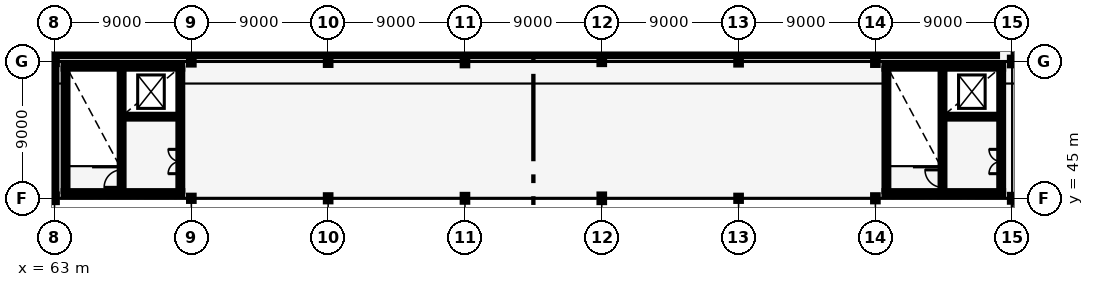
"""IFC4 building model, lengths in metres.
Left out: names, types, materials, properties, quantities, classifications, styles, units other than length and angle.
Written with IfcOpenShell. Run it as: python <this file> out.ifc"""

import sys

from ifc_helpers import new_model, si_unit, direction, frame, frame_2d, origin, origin_2d, place, context, subcontext, project, spatial, rectangle, i_section, extrude, element, fill, save


model = new_model("IFC4")
c1 = context("Model", 3, precision=1e-05, world=origin(), true_north=direction((0.0, 1.0)))
c2 = subcontext(c1, "Body", "Model", "MODEL_VIEW")
j1 = project(units=[si_unit("LENGTHUNIT", "METRE"), si_unit("PLANEANGLEUNIT", "RADIAN")], contexts=[c1])
p1 = place(None, origin())
s1 = spatial("IfcSite", under=j1, at=p1, CompositionType="ELEMENT")
p2 = place(p1, origin())
s2 = spatial("IfcBuilding", under=s1, at=p2, CompositionType="ELEMENT")
p3 = place(p2, frame((0.0, 0.0, 18.0)))
s3 = spatial("IfcBuildingStorey", under=s2, at=p3, CompositionType="ELEMENT", Elevation=18.0)
p4 = place(p3, frame((63.0, 45.0, 0.0), z_axis=(0.0, 0.0, 1.0), x_axis=(1.0, 0.0, 0.0)))
e1 = element("IfcColumn", 1, at=p4, inside=s3, PredefinedType="COLUMN", context=c2, shape_type="SweptSolid", body=[
    extrude(i_section(OverallWidth=0.3, OverallDepth=0.5, WebThickness=0.014, FlangeThickness=0.028, FilletRadius=0.027, at=origin_2d()), origin(), (0.0, 0.0, 1.0), 4.8),
])
for number, where, z_axis, x_axis in (
    (2, (63.0, 54.0, 0.0), (0.0, 0.0, 1.0), (1.0, 0.0, 0.0)),
    (3, (72.0, 45.0, 0.0), (0.0, 0.0, 1.0), (1.0, 0.0, 0.0)),
):
    element("IfcColumn", number, at=place(p3, frame(where, z_axis=z_axis, x_axis=x_axis)), inside=s3, PredefinedType="COLUMN", context=c2, shape_type="SweptSolid", body=[
        extrude(i_section(OverallWidth=0.3, OverallDepth=0.34, WebThickness=0.012, FlangeThickness=0.021, FilletRadius=0.027, at=origin_2d()), origin(), (0.0, 0.0, 1.0), 4.8),
    ])
for number, where, z_axis, x_axis in (
    (4, (72.0, 54.0, 0.0), (0.0, 0.0, 1.0), (1.0, 0.0, 0.0)),
    (5, (81.0, 45.0, 0.0), (0.0, 0.0, 1.0), (1.0, 0.0, 0.0)),
):
    element("IfcColumn", number, at=place(p3, frame(where, z_axis=z_axis, x_axis=x_axis)), inside=s3, PredefinedType="COLUMN", context=c2, shape_type="SweptSolid", body=[
        extrude(i_section(OverallWidth=0.3, OverallDepth=0.4, WebThickness=0.013, FlangeThickness=0.024, FilletRadius=0.027, at=origin_2d()), origin(), (0.0, 0.0, 1.0), 4.8),
    ])
for number, where, z_axis, x_axis in (
    (6, (81.0, 54.0, 0.0), (0.0, 0.0, 1.0), (1.0, 0.0, 0.0)),
    (7, (90.0, 45.0, 0.0), (0.0, 0.0, 1.0), (1.0, 0.0, 0.0)),
):
    element("IfcColumn", number, at=place(p3, frame(where, z_axis=z_axis, x_axis=x_axis)), inside=s3, PredefinedType="COLUMN", context=c2, shape_type="SweptSolid", body=[
        extrude(i_section(OverallWidth=0.3, OverallDepth=0.45, WebThickness=0.014, FlangeThickness=0.026, FilletRadius=0.027, at=origin_2d()), origin(), (0.0, 0.0, 1.0), 4.8),
    ])
for number, where, z_axis, x_axis in (
    (8, (90.0, 54.0, 0.0), (0.0, 0.0, 1.0), (1.0, 0.0, 0.0)),
    (9, (99.0, 45.0, 0.0), (0.0, 0.0, 1.0), (1.0, 0.0, 0.0)),
):
    element("IfcColumn", number, at=place(p3, frame(where, z_axis=z_axis, x_axis=x_axis)), inside=s3, PredefinedType="COLUMN", context=c2, shape_type="SweptSolid", body=[
        extrude(i_section(OverallWidth=0.3, OverallDepth=0.5, WebThickness=0.014, FlangeThickness=0.028, FilletRadius=0.027, at=origin_2d()), origin(), (0.0, 0.0, 1.0), 4.8),
    ])
for number, where, z_axis, x_axis in (
    (10, (99.0, 54.0, 0.0), (0.0, 0.0, 1.0), (1.0, 0.0, 0.0)),
    (11, (108.0, 45.0, 0.0), (0.0, 0.0, 1.0), (1.0, 0.0, 0.0)),
):
    element("IfcColumn", number, at=place(p3, frame(where, z_axis=z_axis, x_axis=x_axis)), inside=s3, PredefinedType="COLUMN", context=c2, shape_type="SweptSolid", body=[
        extrude(i_section(OverallWidth=0.3, OverallDepth=0.34, WebThickness=0.012, FlangeThickness=0.021, FilletRadius=0.027, at=origin_2d()), origin(), (0.0, 0.0, 1.0), 4.8),
    ])
for number, where, z_axis, x_axis in (
    (12, (108.0, 54.0, 0.0), (0.0, 0.0, 1.0), (1.0, 0.0, 0.0)),
    (13, (117.0, 45.0, 0.0), (0.0, 0.0, 1.0), (1.0, 0.0, 0.0)),
):
    element("IfcColumn", number, at=place(p3, frame(where, z_axis=z_axis, x_axis=x_axis)), inside=s3, PredefinedType="COLUMN", context=c2, shape_type="SweptSolid", body=[
        extrude(i_section(OverallWidth=0.3, OverallDepth=0.4, WebThickness=0.013, FlangeThickness=0.024, FilletRadius=0.027, at=origin_2d()), origin(), (0.0, 0.0, 1.0), 4.8),
    ])
for number, where, z_axis, x_axis in (
    (14, (117.0, 54.0, 0.0), (0.0, 0.0, 1.0), (1.0, 0.0, 0.0)),
    (15, (126.0, 45.0, 0.0), (0.0, 0.0, 1.0), (1.0, 0.0, 0.0)),
):
    element("IfcColumn", number, at=place(p3, frame(where, z_axis=z_axis, x_axis=x_axis)), inside=s3, PredefinedType="COLUMN", context=c2, shape_type="SweptSolid", body=[
        extrude(i_section(OverallWidth=0.3, OverallDepth=0.45, WebThickness=0.014, FlangeThickness=0.026, FilletRadius=0.027, at=origin_2d()), origin(), (0.0, 0.0, 1.0), 4.8),
    ])
p5 = place(p3, frame((126.0, 54.0, 0.0), z_axis=(0.0, 0.0, 1.0), x_axis=(1.0, 0.0, 0.0)))
e16 = element("IfcColumn", 16, at=p5, inside=s3, PredefinedType="COLUMN", context=c2, shape_type="SweptSolid", body=[
    extrude(i_section(OverallWidth=0.3, OverallDepth=0.5, WebThickness=0.014, FlangeThickness=0.028, FilletRadius=0.027, at=origin_2d()), origin(), (0.0, 0.0, 1.0), 4.8),
])
p6 = place(p3, frame((63.0, 45.245, 0.0), z_axis=(0.0, 0.0, 1.0), x_axis=(0.0, 1.0, 0.0)))
e17 = element("IfcWall", 17, at=p6, inside=s3, PredefinedType="SOLIDWALL", context=c2, shape_type="SweptSolid", body=[
    extrude(rectangle(XDim=8.59, YDim=0.24, at=frame_2d((4.295, 0.0))), origin(), (0.0, 0.0, 1.0), 3.65),
])
p7 = place(p3, frame((1.0, 54.45, 0.09), z_axis=(0.0, 0.0, 1.0), x_axis=(1.0, 0.0, 0.0)))
e18 = element("IfcWall", 18, at=p7, inside=s3, PredefinedType="PARAPET", context=c2, shape_type="SweptSolid", body=[
    extrude(rectangle(XDim=124.0, YDim=0.195, at=frame_2d((62.0, 0.0))), origin(), (0.0, 0.0, 1.0), 0.49),
])
p8 = place(p3, frame((63.725, 45.47, 0.0), z_axis=(0.0, 0.0, 1.0), x_axis=(0.0, 1.0, 0.0)))
e19 = element("IfcWall", 19, at=p8, inside=s3, PredefinedType="SHEAR", context=c2, shape_type="SweptSolid", body=[
    extrude(rectangle(XDim=8.06, YDim=0.25, at=frame_2d((4.03, 0.0))), origin(), (0.0, 0.0, 1.0), 4.46),
])
p9 = place(p3, frame((71.275, 45.47, 0.0), z_axis=(0.0, 0.0, 1.0), x_axis=(0.0, 1.0, 0.0)))
e20 = element("IfcWall", 20, at=p9, inside=s3, PredefinedType="SHEAR", context=c2, shape_type="SweptSolid", body=[
    extrude(rectangle(XDim=8.06, YDim=0.25, at=frame_2d((4.03, 0.0))), origin(), (0.0, 0.0, 1.0), 4.46),
])
p10 = place(p9, frame((1.15, 0.0, 0.0)))
e21 = element("IfcOpeningElement", 21, at=p10, cuts=e20, PredefinedType="OPENING", context=c2, shape_type="SweptSolid", body=[
    extrude(rectangle(XDim=1.6, YDim=2.2, at=frame_2d((0.8, 1.1))), frame((0.0, 0.135, 0.0), z_axis=(0.0, -1.0, 0.0), x_axis=(1.0, 0.0, 0.0)), (0.0, 0.0, 1.0), 0.27),
])
for number, where, z_axis, x_axis in (
    (22, (63.6, 45.345, 0.0), (0.0, 0.0, 1.0), (1.0, 0.0, 0.0)),
    (23, (63.6, 53.655, 0.0), (0.0, 0.0, 1.0), (1.0, 0.0, 0.0)),
):
    element("IfcWall", number, at=place(p3, frame(where, z_axis=z_axis, x_axis=x_axis)), inside=s3, PredefinedType="SHEAR", context=c2, shape_type="SweptSolid", body=[
        extrude(rectangle(XDim=7.8, YDim=0.25, at=frame_2d((3.9, 0.0))), origin(), (0.0, 0.0, 1.0), 4.46),
    ])
p11 = place(p3, frame((67.415, 45.47, 0.0), z_axis=(0.0, 0.0, 1.0), x_axis=(0.0, 1.0, 0.0)))
e24 = element("IfcWall", 24, at=p11, inside=s3, PredefinedType="SHEAR", context=c2, shape_type="SweptSolid", body=[
    extrude(rectangle(XDim=8.06, YDim=0.25, at=frame_2d((4.03, 0.0))), origin(), (0.0, 0.0, 1.0), 4.46),
])
p12 = place(p11, frame((0.25, 0.0, 0.0)))
e25 = element("IfcOpeningElement", 25, at=p12, cuts=e24, PredefinedType="OPENING", context=c2, shape_type="SweptSolid", body=[
    extrude(rectangle(XDim=1.15, YDim=2.15, at=frame_2d((0.575, 1.075))), frame((0.0, 0.135, 0.0), z_axis=(0.0, -1.0, 0.0), x_axis=(1.0, 0.0, 0.0)), (0.0, 0.0, 1.0), 0.27),
])
p13 = place(p3, frame((67.54, 50.37, 0.0), z_axis=(0.0, 0.0, 1.0), x_axis=(1.0, 0.0, 0.0)))
e26 = element("IfcWall", 26, at=p13, inside=s3, PredefinedType="SHEAR", context=c2, shape_type="SweptSolid", body=[
    extrude(rectangle(XDim=3.61, YDim=0.25, at=frame_2d((1.805, 0.0))), origin(), (0.0, 0.0, 1.0), 4.46),
])
p14 = place(p13, frame((0.95, 0.0, 0.0)))
e27 = element("IfcOpeningElement", 27, at=p14, cuts=e26, PredefinedType="OPENING", context=c2, shape_type="SweptSolid", body=[
    extrude(rectangle(XDim=1.2, YDim=2.2, at=frame_2d((0.6, 1.1))), frame((0.0, 0.135, 0.0), z_axis=(0.0, -1.0, 0.0), x_axis=(1.0, 0.0, 0.0)), (0.0, 0.0, 1.0), 0.27),
])
p15 = place(p3, frame((117.725, 45.47, 0.0), z_axis=(0.0, 0.0, 1.0), x_axis=(0.0, 1.0, 0.0)))
e28 = element("IfcWall", 28, at=p15, inside=s3, PredefinedType="SHEAR", context=c2, shape_type="SweptSolid", body=[
    extrude(rectangle(XDim=8.06, YDim=0.25, at=frame_2d((4.03, 0.0))), origin(), (0.0, 0.0, 1.0), 4.46),
])
p16 = place(p3, frame((125.275, 45.47, 0.0), z_axis=(0.0, 0.0, 1.0), x_axis=(0.0, 1.0, 0.0)))
e29 = element("IfcWall", 29, at=p16, inside=s3, PredefinedType="SHEAR", context=c2, shape_type="SweptSolid", body=[
    extrude(rectangle(XDim=8.06, YDim=0.25, at=frame_2d((4.03, 0.0))), origin(), (0.0, 0.0, 1.0), 4.46),
])
p17 = place(p16, frame((1.15, 0.0, 0.0)))
e30 = element("IfcOpeningElement", 30, at=p17, cuts=e29, PredefinedType="OPENING", context=c2, shape_type="SweptSolid", body=[
    extrude(rectangle(XDim=1.6, YDim=2.2, at=frame_2d((0.8, 1.1))), frame((0.0, 0.135, 0.0), z_axis=(0.0, -1.0, 0.0), x_axis=(1.0, 0.0, 0.0)), (0.0, 0.0, 1.0), 0.27),
])
for number, where, z_axis, x_axis in (
    (31, (117.6, 45.345, 0.0), (0.0, 0.0, 1.0), (1.0, 0.0, 0.0)),
    (32, (117.6, 53.655, 0.0), (0.0, 0.0, 1.0), (1.0, 0.0, 0.0)),
):
    element("IfcWall", number, at=place(p3, frame(where, z_axis=z_axis, x_axis=x_axis)), inside=s3, PredefinedType="SHEAR", context=c2, shape_type="SweptSolid", body=[
        extrude(rectangle(XDim=7.8, YDim=0.25, at=frame_2d((3.9, 0.0))), origin(), (0.0, 0.0, 1.0), 4.46),
    ])
p18 = place(p3, frame((121.415, 45.47, 0.0), z_axis=(0.0, 0.0, 1.0), x_axis=(0.0, 1.0, 0.0)))
e33 = element("IfcWall", 33, at=p18, inside=s3, PredefinedType="SHEAR", context=c2, shape_type="SweptSolid", body=[
    extrude(rectangle(XDim=8.06, YDim=0.25, at=frame_2d((4.03, 0.0))), origin(), (0.0, 0.0, 1.0), 4.46),
])
p19 = place(p18, frame((0.25, 0.0, 0.0)))
e34 = element("IfcOpeningElement", 34, at=p19, cuts=e33, PredefinedType="OPENING", context=c2, shape_type="SweptSolid", body=[
    extrude(rectangle(XDim=1.15, YDim=2.15, at=frame_2d((0.575, 1.075))), frame((0.0, 0.135, 0.0), z_axis=(0.0, -1.0, 0.0), x_axis=(1.0, 0.0, 0.0)), (0.0, 0.0, 1.0), 0.27),
])
p20 = place(p3, frame((121.54, 50.37, 0.0), z_axis=(0.0, 0.0, 1.0), x_axis=(1.0, 0.0, 0.0)))
e35 = element("IfcWall", 35, at=p20, inside=s3, PredefinedType="SHEAR", context=c2, shape_type="SweptSolid", body=[
    extrude(rectangle(XDim=3.61, YDim=0.25, at=frame_2d((1.805, 0.0))), origin(), (0.0, 0.0, 1.0), 4.46),
])
p21 = place(p20, frame((0.95, 0.0, 0.0)))
e36 = element("IfcOpeningElement", 36, at=p21, cuts=e35, PredefinedType="OPENING", context=c2, shape_type="SweptSolid", body=[
    extrude(rectangle(XDim=1.2, YDim=2.2, at=frame_2d((0.6, 1.1))), frame((0.0, 0.135, 0.0), z_axis=(0.0, -1.0, 0.0), x_axis=(1.0, 0.0, 0.0)), (0.0, 0.0, 1.0), 0.27),
])
p22 = place(p12, origin())
e37 = element("IfcDoor", 37, at=p22, inside=s3, OperationType="SINGLE_SWING_LEFT", PredefinedType="DOOR", context=c2, shape_type="SweptSolid", body=[
    extrude(rectangle(XDim=1.15, YDim=2.15, at=frame_2d((0.575, 1.075))), frame((0.0, 0.025, 0.0), z_axis=(0.0, -1.0, 0.0), x_axis=(1.0, 0.0, 0.0)), (0.0, 0.0, 1.0), 0.05),
])
fill(e25, e37)
p23 = place(p14, origin())
e38 = element("IfcDoor", 38, at=p23, inside=s3, OperationType="DOUBLE_DOOR_SLIDING", PredefinedType="DOOR", context=c2, shape_type="SweptSolid", body=[
    extrude(rectangle(XDim=1.2, YDim=2.2, at=frame_2d((0.6, 1.1))), frame((0.0, 0.025, 0.0), z_axis=(0.0, -1.0, 0.0), x_axis=(1.0, 0.0, 0.0)), (0.0, 0.0, 1.0), 0.05),
])
fill(e27, e38)
p24 = place(p10, origin())
e39 = element("IfcDoor", 39, at=p24, inside=s3, OperationType="DOUBLE_DOOR_SINGLE_SWING", PredefinedType="DOOR", context=c2, shape_type="SweptSolid", body=[
    extrude(rectangle(XDim=1.6, YDim=2.2, at=frame_2d((0.8, 1.1))), frame((0.0, 0.025, 0.0), z_axis=(0.0, -1.0, 0.0), x_axis=(1.0, 0.0, 0.0)), (0.0, 0.0, 1.0), 0.05),
])
fill(e21, e39)
p25 = place(p19, origin())
e40 = element("IfcDoor", 40, at=p25, inside=s3, OperationType="SINGLE_SWING_RIGHT", PredefinedType="DOOR", context=c2, shape_type="SweptSolid", body=[
    extrude(rectangle(XDim=1.15, YDim=2.15, at=frame_2d((0.575, 1.075))), frame((0.0, 0.025, 0.0), z_axis=(0.0, -1.0, 0.0), x_axis=(1.0, 0.0, 0.0)), (0.0, 0.0, 1.0), 0.05),
])
fill(e34, e40)
p26 = place(p21, origin())
e41 = element("IfcDoor", 41, at=p26, inside=s3, OperationType="DOUBLE_DOOR_SLIDING", PredefinedType="DOOR", context=c2, shape_type="SweptSolid", body=[
    extrude(rectangle(XDim=1.2, YDim=2.2, at=frame_2d((0.6, 1.1))), frame((0.0, 0.025, 0.0), z_axis=(0.0, -1.0, 0.0), x_axis=(1.0, 0.0, 0.0)), (0.0, 0.0, 1.0), 0.05),
])
fill(e36, e41)
p27 = place(p17, origin())
e42 = element("IfcDoor", 42, at=p27, inside=s3, OperationType="DOUBLE_DOOR_SINGLE_SWING", PredefinedType="DOOR", context=c2, shape_type="SweptSolid", body=[
    extrude(rectangle(XDim=1.6, YDim=2.2, at=frame_2d((0.8, 1.1))), frame((0.0, 0.025, 0.0), z_axis=(0.0, -1.0, 0.0), x_axis=(1.0, 0.0, 0.0)), (0.0, 0.0, 1.0), 0.05),
])
fill(e30, e42)
save(model, sys.argv[1])
